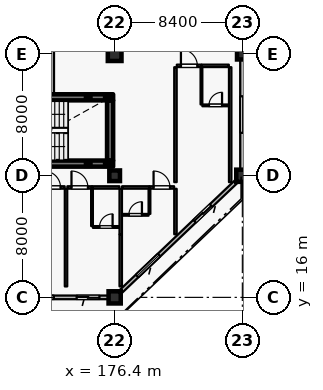
"""IFC4 building model, lengths in metres.
Left out: names, types, materials, properties, quantities, classifications, styles, units other than length and angle.
Written with IfcOpenShell. Run it as: python <this file> out.ifc"""

import sys

from ifc_helpers import new_model, si_unit, direction, frame, frame_2d, origin, origin_2d, place, context, subcontext, project, spatial, rectangle, hollow_rectangle, extrude, element, fill, save


model = new_model("IFC4")
c1 = context("Model", 3, precision=1e-05, world=origin(), true_north=direction((0.0, 1.0)))
c2 = subcontext(c1, "Body", "Model", "MODEL_VIEW")
j1 = project(units=[si_unit("LENGTHUNIT", "METRE"), si_unit("PLANEANGLEUNIT", "RADIAN")], contexts=[c1])
p1 = place(None, origin())
s1 = spatial("IfcSite", under=j1, at=p1, CompositionType="ELEMENT")
p2 = place(p1, origin())
s2 = spatial("IfcBuilding", under=s1, at=p2, CompositionType="ELEMENT")
p3 = place(p2, frame((0.0, 0.0, 21.0)))
s3 = spatial("IfcBuildingStorey", under=s2, at=p3, CompositionType="ELEMENT", Elevation=21.0)
p4 = place(p3, frame((176.4, 16.0, 0.0), z_axis=(0.0, 0.0, 1.0), x_axis=(1.0, 0.0, 0.0)))
e1 = element("IfcColumn", 1, at=p4, inside=s3, PredefinedType="COLUMN", context=c2, shape_type="SweptSolid", body=[
    extrude(rectangle(XDim=0.8, YDim=0.8, at=origin_2d()), origin(), (0.0, 0.0, 1.0), 4.2),
])
p5 = place(p3, frame((176.4, 32.0, 0.0), z_axis=(0.0, 0.0, 1.0), x_axis=(1.0, 0.0, 0.0)))
e2 = element("IfcColumn", 2, at=p5, inside=s3, PredefinedType="COLUMN", context=c2, shape_type="SweptSolid", body=[
    extrude(rectangle(XDim=0.9, YDim=0.9, at=origin_2d()), origin(), (0.0, 0.0, 1.0), 4.2),
])
p6 = place(p3, frame((184.8, 24.0, 0.0), z_axis=(0.0, 0.0, 1.0), x_axis=(1.0, 0.0, 0.0)))
e3 = element("IfcColumn", 3, at=p6, inside=s3, PredefinedType="COLUMN", context=c2, shape_type="SweptSolid", body=[
    extrude(rectangle(XDim=0.8, YDim=0.8, at=origin_2d()), origin(), (0.0, 0.0, 1.0), 4.2),
])
for number, where, z_axis, x_axis in (
    (4, (176.4, 24.0, 0.0), (0.0, 0.0, 1.0), (1.0, 0.0, 0.0)),
    (5, (184.8, 32.0, 0.0), (0.0, 0.0, 1.0), (1.0, 0.0, 0.0)),
):
    element("IfcColumn", number, at=place(p3, frame(where, z_axis=z_axis, x_axis=x_axis)), inside=s3, PredefinedType="COLUMN", context=c2, shape_type="SweptSolid", body=[
        extrude(rectangle(XDim=0.7, YDim=0.7, at=origin_2d()), origin(), (0.0, 0.0, 1.0), 4.2),
    ])
p7 = place(p3, frame((176.0, 16.0, 0.0), z_axis=(0.0, 0.0, 1.0), x_axis=(-1.0, 0.0, 0.0)))
e6 = element("IfcWall", 6, at=p7, inside=s3, PredefinedType="SOLIDWALL", context=c2, shape_type="SweptSolid", body=[
    extrude(rectangle(XDim=7.6, YDim=0.24, at=frame_2d((3.8, 0.0))), origin(), (0.0, 0.0, 1.0), 3.53),
])
p8 = place(p7, frame((0.6, 0.0, 0.0)))
e7 = element("IfcOpeningElement", 7, at=p8, cuts=e6, PredefinedType="OPENING", context=c2, shape_type="SweptSolid", body=[
    extrude(rectangle(XDim=1.5, YDim=2.25, at=frame_2d((0.75, 1.125))), frame((0.0, 0.13, 0.0), z_axis=(0.0, -1.0, 0.0), x_axis=(1.0, 0.0, 0.0)), (0.0, 0.0, 1.0), 0.26),
])
p9 = place(p7, frame((3.6, 0.0, 0.8)))
e8 = element("IfcOpeningElement", 8, at=p9, cuts=e6, PredefinedType="OPENING", context=c2, shape_type="SweptSolid", body=[
    extrude(rectangle(XDim=2.0, YDim=1.75, at=frame_2d((1.0, 0.875))), frame((0.0, 0.13, 0.0), z_axis=(0.0, -1.0, 0.0), x_axis=(1.0, 0.0, 0.0)), (0.0, 0.0, 1.0), 0.26),
])
p10 = place(p3, frame((184.4, 23.619, 0.0), z_axis=(0.0, 0.0, 1.0), x_axis=(-0.724145676014, -0.689647040094, 0.0)))
e9 = element("IfcWall", 9, at=p10, inside=s3, PredefinedType="SOLIDWALL", context=c2, shape_type="SweptSolid", body=[
    extrude(rectangle(XDim=10.495, YDim=0.24, at=frame_2d((5.248, 0.0))), origin(), (0.0, 0.0, 1.0), 3.53),
])
p11 = place(p10, frame((2.288, 0.0, 0.0)))
e10 = element("IfcOpeningElement", 10, at=p11, cuts=e9, PredefinedType="OPENING", context=c2, shape_type="SweptSolid", body=[
    extrude(rectangle(XDim=1.5, YDim=2.25, at=frame_2d((0.75, 1.125))), frame((0.0, 0.13, 0.0), z_axis=(0.0, -1.0, 0.0), x_axis=(1.0, 0.0, 0.0)), (0.0, 0.0, 1.0), 0.26),
])
p12 = place(p10, frame((7.009, 0.0, 0.8)))
e11 = element("IfcOpeningElement", 11, at=p12, cuts=e9, PredefinedType="OPENING", context=c2, shape_type="SweptSolid", body=[
    extrude(rectangle(XDim=2.0, YDim=1.75, at=frame_2d((1.0, 0.875))), frame((0.0, 0.13, 0.0), z_axis=(0.0, -1.0, 0.0), x_axis=(1.0, 0.0, 0.0)), (0.0, 0.0, 1.0), 0.26),
])
p13 = place(p3, frame((184.8, 31.65, 0.0), z_axis=(0.0, 0.0, 1.0), x_axis=(0.0, -1.0, 0.0)))
e12 = element("IfcWall", 12, at=p13, inside=s3, PredefinedType="SOLIDWALL", context=c2, shape_type="SweptSolid", body=[
    extrude(rectangle(XDim=7.25, YDim=0.28, at=frame_2d((3.625, 0.0))), origin(), (0.0, 0.0, 1.0), 3.3),
])
p14 = place(p13, frame((2.425, 0.0, 0.75)))
e13 = element("IfcOpeningElement", 13, at=p14, cuts=e12, PredefinedType="OPENING", context=c2, shape_type="SweptSolid", body=[
    extrude(rectangle(XDim=2.4, YDim=1.65, at=frame_2d((1.2, 0.825))), frame((0.0, 0.15, 0.0), z_axis=(0.0, -1.0, 0.0), x_axis=(1.0, 0.0, 0.0)), (0.0, 0.0, 1.0), 0.3),
])
p15 = place(p3, frame((168.1, 24.8, 0.0), z_axis=(0.0, 0.0, 1.0), x_axis=(1.0, 0.0, 0.0)))
e14 = element("IfcWall", 14, at=p15, inside=s3, PredefinedType="SHEAR", context=c2, shape_type="SweptSolid", body=[
    extrude(rectangle(XDim=8.2, YDim=0.4, at=frame_2d((4.1, 0.0))), origin(), (0.0, 0.0, 1.0), 3.965),
])
p16 = place(p3, frame((176.1, 25.005, 0.0), z_axis=(0.0, 0.0, 1.0), x_axis=(0.0, 1.0, 0.0)))
e15 = element("IfcWall", 15, at=p16, inside=s3, PredefinedType="SHEAR", context=c2, shape_type="SweptSolid", body=[
    extrude(rectangle(XDim=3.95, YDim=0.4, at=frame_2d((1.975, 0.0))), origin(), (0.0, 0.0, 1.0), 3.965),
])
p17 = place(p3, frame((168.1, 29.16, 0.0), z_axis=(0.0, 0.0, 1.0), x_axis=(1.0, 0.0, 0.0)))
e16 = element("IfcWall", 16, at=p17, inside=s3, PredefinedType="SHEAR", context=c2, shape_type="SweptSolid", body=[
    extrude(rectangle(XDim=8.2, YDim=0.4, at=frame_2d((4.1, 0.0))), origin(), (0.0, 0.0, 1.0), 3.965),
])
p18 = place(p17, frame((0.43, 0.0, 0.0)))
e17 = element("IfcOpeningElement", 17, at=p18, cuts=e16, PredefinedType="OPENING", context=c2, shape_type="SweptSolid", body=[
    extrude(rectangle(XDim=1.16, YDim=2.2, at=frame_2d((0.58, 1.1))), frame((0.0, 0.21, 0.0), z_axis=(0.0, -1.0, 0.0), x_axis=(1.0, 0.0, 0.0)), (0.0, 0.0, 1.0), 0.42),
])
p19 = place(p3, frame((172.3, 29.365, 0.0), z_axis=(0.0, 0.0, 1.0), x_axis=(0.0, 1.0, 0.0)))
e18 = element("IfcWall", 18, at=p19, inside=s3, PredefinedType="PARTITIONING", context=c2, shape_type="SweptSolid", body=[
    extrude(rectangle(XDim=2.92, YDim=0.22, at=frame_2d((1.46, 0.0))), origin(), (0.0, 0.0, 1.0), 3.965),
])
for number, where, z_axis, x_axis in (
    (19, (174.66, 24.8, -2.4), (0.0, 0.0, 1.0), (1.0, 0.0, 0.0)),
    (20, (174.66, 29.16, -2.4), (0.0, 0.0, 1.0), (1.0, 0.0, 0.0)),
    (21, (175.92, 24.8, -2.4), (0.0, 0.0, 1.0), (1.0, 0.0, 0.0)),
    (22, (175.92, 29.16, -2.4), (0.0, 0.0, 1.0), (1.0, 0.0, 0.0)),
):
    element("IfcColumn", number, at=place(p3, frame(where, z_axis=z_axis, x_axis=x_axis)), inside=s3, PredefinedType="COLUMN", context=c2, shape_type="SweptSolid", body=[
        extrude(hollow_rectangle(XDim=0.3, YDim=0.3, WallThickness=0.012, at=origin_2d()), origin(), (0.0, 0.0, 1.0), 4.32),
    ])
p20 = place(p3, frame((171.49, 23.23, 0.0), z_axis=(0.0, 0.0, 1.0), x_axis=(1.0, 0.0, 0.0)))
e23 = element("IfcWall", 23, at=p20, inside=s3, PredefinedType="PARTITIONING", context=c2, shape_type="SweptSolid", body=[
    extrude(rectangle(XDim=1.62, YDim=0.16, at=frame_2d((0.81, 0.0))), origin(), (0.0, 0.0, 1.0), 3.965),
])
p21 = place(p20, frame((0.27, 0.0, 0.0)))
e24 = element("IfcOpeningElement", 24, at=p21, cuts=e23, PredefinedType="OPENING", context=c2, shape_type="SweptSolid", body=[
    extrude(rectangle(XDim=1.08, YDim=2.3, at=frame_2d((0.54, 1.15))), frame((0.0, 0.09, 0.0), z_axis=(0.0, -1.0, 0.0), x_axis=(1.0, 0.0, 0.0)), (0.0, 0.0, 1.0), 0.18),
])
p22 = place(p3, frame((173.29, 23.23, 0.0), z_axis=(0.0, 0.0, 1.0), x_axis=(1.0, 0.0, 0.0)))
e25 = element("IfcWall", 25, at=p22, inside=s3, PredefinedType="PARTITIONING", context=c2, shape_type="SweptSolid", body=[
    extrude(rectangle(XDim=1.62, YDim=0.16, at=frame_2d((0.81, 0.0))), origin(), (0.0, 0.0, 1.0), 3.965),
])
p23 = place(p22, frame((0.27, 0.0, 0.0)))
e26 = element("IfcOpeningElement", 26, at=p23, cuts=e25, PredefinedType="OPENING", context=c2, shape_type="SweptSolid", body=[
    extrude(rectangle(XDim=1.08, YDim=2.3, at=frame_2d((0.54, 1.15))), frame((0.0, 0.09, 0.0), z_axis=(0.0, -1.0, 0.0), x_axis=(1.0, 0.0, 0.0)), (0.0, 0.0, 1.0), 0.18),
])
p24 = place(p3, frame((174.92, 23.23, 0.0), z_axis=(0.0, 0.0, 1.0), x_axis=(1.0, 0.0, 0.0)))
e27 = element("IfcWall", 27, at=p24, inside=s3, PredefinedType="PARTITIONING", context=c2, shape_type="SweptSolid", body=[
    extrude(rectangle(XDim=1.79, YDim=0.16, at=frame_2d((0.895, 0.0))), origin(), (0.0, 0.0, 1.0), 3.965),
])
p25 = place(p3, frame((174.91, 20.69, 0.0), z_axis=(0.0, 0.0, 1.0), x_axis=(0.0, 1.0, 0.0)))
e28 = element("IfcWall", 28, at=p25, inside=s3, PredefinedType="PARTITIONING", context=c2, shape_type="SweptSolid", body=[
    extrude(rectangle(XDim=2.45, YDim=0.115, at=frame_2d((1.225, 0.0))), origin(), (0.0, 0.0, 1.0), 3.965),
])
p26 = place(p3, frame((174.97, 20.63, 0.0), z_axis=(0.0, 0.0, 1.0), x_axis=(1.0, 0.0, 0.0)))
e29 = element("IfcWall", 29, at=p26, inside=s3, PredefinedType="PARTITIONING", context=c2, shape_type="SweptSolid", body=[
    extrude(rectangle(XDim=1.73, YDim=0.115, at=frame_2d((0.865, 0.0))), origin(), (0.0, 0.0, 1.0), 3.965),
])
p27 = place(p26, frame((0.435, 0.0, 0.0)))
e30 = element("IfcOpeningElement", 30, at=p27, cuts=e29, PredefinedType="OPENING", context=c2, shape_type="SweptSolid", body=[
    extrude(rectangle(XDim=0.86, YDim=2.12, at=frame_2d((0.43, 1.06))), frame((0.0, 0.067, 0.0), z_axis=(0.0, -1.0, 0.0), x_axis=(1.0, 0.0, 0.0)), (0.0, 0.0, 1.0), 0.135),
])
p28 = place(p3, frame((173.2, 16.72, 0.0), z_axis=(0.0, 0.0, 1.0), x_axis=(0.0, 1.0, 0.0)))
e31 = element("IfcWall", 31, at=p28, inside=s3, PredefinedType="PARTITIONING", context=c2, shape_type="SweptSolid", body=[
    extrude(rectangle(XDim=6.42, YDim=0.16, at=frame_2d((3.21, 0.0))), origin(), (0.0, 0.0, 1.0), 3.965),
])
p29 = place(p3, frame((176.8, 16.72, 0.0), z_axis=(0.0, 0.0, 1.0), x_axis=(0.0, 1.0, 0.0)))
e32 = element("IfcWall", 32, at=p29, inside=s3, PredefinedType="PARTITIONING", context=c2, shape_type="SweptSolid", body=[
    extrude(rectangle(XDim=3.42, YDim=0.16, at=frame_2d((1.71, 0.0))), origin(), (0.0, 0.0, 1.0), 3.965),
])
p30 = place(p3, frame((176.89, 23.23, 0.0), z_axis=(0.0, 0.0, 1.0), x_axis=(1.0, 0.0, 0.0)))
e33 = element("IfcWall", 33, at=p30, inside=s3, PredefinedType="PARTITIONING", context=c2, shape_type="SweptSolid", body=[
    extrude(rectangle(XDim=1.79, YDim=0.16, at=frame_2d((0.895, 0.0))), origin(), (0.0, 0.0, 1.0), 3.965),
])
p31 = place(p3, frame((178.69, 23.23, 0.0), z_axis=(0.0, 0.0, 1.0), x_axis=(1.0, 0.0, 0.0)))
e34 = element("IfcWall", 34, at=p31, inside=s3, PredefinedType="PARTITIONING", context=c2, shape_type="SweptSolid", body=[
    extrude(rectangle(XDim=1.62, YDim=0.16, at=frame_2d((0.81, 0.0))), origin(), (0.0, 0.0, 1.0), 3.965),
])
p32 = place(p31, frame((0.27, 0.0, 0.0)))
e35 = element("IfcOpeningElement", 35, at=p32, cuts=e34, PredefinedType="OPENING", context=c2, shape_type="SweptSolid", body=[
    extrude(rectangle(XDim=1.08, YDim=2.3, at=frame_2d((0.54, 1.15))), frame((0.0, 0.09, 0.0), z_axis=(0.0, -1.0, 0.0), x_axis=(1.0, 0.0, 0.0)), (0.0, 0.0, 1.0), 0.18),
])
p33 = place(p3, frame((178.69, 21.49, 0.0), z_axis=(0.0, 0.0, 1.0), x_axis=(0.0, 1.0, 0.0)))
e36 = element("IfcWall", 36, at=p33, inside=s3, PredefinedType="PARTITIONING", context=c2, shape_type="SweptSolid", body=[
    extrude(rectangle(XDim=1.65, YDim=0.115, at=frame_2d((0.825, 0.0))), origin(), (0.0, 0.0, 1.0), 3.965),
])
p34 = place(p3, frame((176.9, 21.43, 0.0), z_axis=(0.0, 0.0, 1.0), x_axis=(1.0, 0.0, 0.0)))
e37 = element("IfcWall", 37, at=p34, inside=s3, PredefinedType="PARTITIONING", context=c2, shape_type="SweptSolid", body=[
    extrude(rectangle(XDim=1.73, YDim=0.115, at=frame_2d((0.865, 0.0))), origin(), (0.0, 0.0, 1.0), 3.965),
])
p35 = place(p34, frame((0.435, 0.0, 0.0)))
e38 = element("IfcOpeningElement", 38, at=p35, cuts=e37, PredefinedType="OPENING", context=c2, shape_type="SweptSolid", body=[
    extrude(rectangle(XDim=0.86, YDim=2.12, at=frame_2d((0.43, 1.06))), frame((0.0, 0.067, 0.0), z_axis=(0.0, -1.0, 0.0), x_axis=(1.0, 0.0, 0.0)), (0.0, 0.0, 1.0), 0.135),
])
for number, where, z_axis, x_axis in (
    (39, (176.8, 20.15, 0.0), (0.0, 0.0, 1.0), (0.0, 1.0, 0.0)),
    (40, (180.4, 20.15, 0.0), (0.0, 0.0, 1.0), (0.0, 1.0, 0.0)),
):
    element("IfcWall", number, at=place(p3, frame(where, z_axis=z_axis, x_axis=x_axis)), inside=s3, PredefinedType="PARTITIONING", context=c2, shape_type="SweptSolid", body=[
        extrude(rectangle(XDim=2.99, YDim=0.16, at=frame_2d((1.495, 0.0))), origin(), (0.0, 0.0, 1.0), 3.965),
    ])
p36 = place(p3, frame((180.49, 31.23, 0.0), z_axis=(0.0, 0.0, 1.0), x_axis=(1.0, 0.0, 0.0)))
e41 = element("IfcWall", 41, at=p36, inside=s3, PredefinedType="PARTITIONING", context=c2, shape_type="SweptSolid", body=[
    extrude(rectangle(XDim=1.62, YDim=0.16, at=frame_2d((0.81, 0.0))), origin(), (0.0, 0.0, 1.0), 3.965),
])
p37 = place(p36, frame((0.27, 0.0, 0.0)))
e42 = element("IfcOpeningElement", 42, at=p37, cuts=e41, PredefinedType="OPENING", context=c2, shape_type="SweptSolid", body=[
    extrude(rectangle(XDim=1.08, YDim=2.3, at=frame_2d((0.54, 1.15))), frame((0.0, 0.09, 0.0), z_axis=(0.0, -1.0, 0.0), x_axis=(1.0, 0.0, 0.0)), (0.0, 0.0, 1.0), 0.18),
])
p38 = place(p3, frame((182.12, 31.23, 0.0), z_axis=(0.0, 0.0, 1.0), x_axis=(1.0, 0.0, 0.0)))
e43 = element("IfcWall", 43, at=p38, inside=s3, PredefinedType="PARTITIONING", context=c2, shape_type="SweptSolid", body=[
    extrude(rectangle(XDim=1.79, YDim=0.16, at=frame_2d((0.895, 0.0))), origin(), (0.0, 0.0, 1.0), 3.965),
])
p39 = place(p3, frame((182.11, 28.69, 0.0), z_axis=(0.0, 0.0, 1.0), x_axis=(0.0, 1.0, 0.0)))
e44 = element("IfcWall", 44, at=p39, inside=s3, PredefinedType="PARTITIONING", context=c2, shape_type="SweptSolid", body=[
    extrude(rectangle(XDim=2.45, YDim=0.115, at=frame_2d((1.225, 0.0))), origin(), (0.0, 0.0, 1.0), 3.965),
])
p40 = place(p3, frame((182.17, 28.63, 0.0), z_axis=(0.0, 0.0, 1.0), x_axis=(1.0, 0.0, 0.0)))
e45 = element("IfcWall", 45, at=p40, inside=s3, PredefinedType="PARTITIONING", context=c2, shape_type="SweptSolid", body=[
    extrude(rectangle(XDim=1.73, YDim=0.115, at=frame_2d((0.865, 0.0))), origin(), (0.0, 0.0, 1.0), 3.965),
])
p41 = place(p40, frame((0.435, 0.0, 0.0)))
e46 = element("IfcOpeningElement", 46, at=p41, cuts=e45, PredefinedType="OPENING", context=c2, shape_type="SweptSolid", body=[
    extrude(rectangle(XDim=0.86, YDim=2.12, at=frame_2d((0.43, 1.06))), frame((0.0, 0.067, 0.0), z_axis=(0.0, -1.0, 0.0), x_axis=(1.0, 0.0, 0.0)), (0.0, 0.0, 1.0), 0.135),
])
for number, where, z_axis, x_axis in (
    (47, (180.4, 23.58, 0.0), (0.0, 0.0, 1.0), (0.0, 1.0, 0.0)),
    (48, (184.0, 23.58, 0.0), (0.0, 0.0, 1.0), (0.0, 1.0, 0.0)),
):
    element("IfcWall", number, at=place(p3, frame(where, z_axis=z_axis, x_axis=x_axis)), inside=s3, PredefinedType="PARTITIONING", context=c2, shape_type="SweptSolid", body=[
        extrude(rectangle(XDim=7.56, YDim=0.16, at=frame_2d((3.78, 0.0))), origin(), (0.0, 0.0, 1.0), 3.965),
    ])
p42 = place(p8, origin())
e49 = element("IfcDoor", 49, at=p42, inside=s3, OperationType="SLIDING_TO_LEFT", PredefinedType="DOOR", context=c2, shape_type="SweptSolid", body=[
    extrude(rectangle(XDim=1.5, YDim=2.25, at=frame_2d((0.75, 1.125))), frame((0.0, 0.025, 0.0), z_axis=(0.0, -1.0, 0.0), x_axis=(1.0, 0.0, 0.0)), (0.0, 0.0, 1.0), 0.05),
])
fill(e7, e49)
p43 = place(p9, origin())
e50 = element("IfcWindow", 50, at=p43, inside=s3, PartitioningType="DOUBLE_PANEL_VERTICAL", PredefinedType="WINDOW", context=c2, shape_type="SweptSolid", body=[
    extrude(rectangle(XDim=2.0, YDim=1.75, at=frame_2d((1.0, 0.875))), frame((0.0, 0.03, 0.0), z_axis=(0.0, -1.0, 0.0), x_axis=(1.0, 0.0, 0.0)), (0.0, 0.0, 1.0), 0.06),
])
fill(e8, e50)
p44 = place(p11, origin())
e51 = element("IfcDoor", 51, at=p44, inside=s3, OperationType="SLIDING_TO_LEFT", PredefinedType="DOOR", context=c2, shape_type="SweptSolid", body=[
    extrude(rectangle(XDim=1.5, YDim=2.25, at=frame_2d((0.75, 1.125))), frame((0.0, 0.025, 0.0), z_axis=(0.0, -1.0, 0.0), x_axis=(1.0, 0.0, 0.0)), (0.0, 0.0, 1.0), 0.05),
])
fill(e10, e51)
p45 = place(p12, origin())
e52 = element("IfcWindow", 52, at=p45, inside=s3, PartitioningType="DOUBLE_PANEL_VERTICAL", PredefinedType="WINDOW", context=c2, shape_type="SweptSolid", body=[
    extrude(rectangle(XDim=2.0, YDim=1.75, at=frame_2d((1.0, 0.875))), frame((0.0, 0.03, 0.0), z_axis=(0.0, -1.0, 0.0), x_axis=(1.0, 0.0, 0.0)), (0.0, 0.0, 1.0), 0.06),
])
fill(e11, e52)
p46 = place(p14, origin())
e53 = element("IfcWindow", 53, at=p46, inside=s3, PartitioningType="DOUBLE_PANEL_VERTICAL", PredefinedType="WINDOW", context=c2, shape_type="SweptSolid", body=[
    extrude(rectangle(XDim=2.4, YDim=1.65, at=frame_2d((1.2, 0.825))), frame((0.0, 0.03, 0.0), z_axis=(0.0, -1.0, 0.0), x_axis=(1.0, 0.0, 0.0)), (0.0, 0.0, 1.0), 0.06),
])
fill(e13, e53)
p47 = place(p21, origin())
e54 = element("IfcDoor", 54, at=p47, inside=s3, OperationType="SINGLE_SWING_LEFT", PredefinedType="DOOR", context=c2, shape_type="SweptSolid", body=[
    extrude(rectangle(XDim=1.08, YDim=2.3, at=frame_2d((0.54, 1.15))), frame((0.0, 0.025, 0.0), z_axis=(0.0, -1.0, 0.0), x_axis=(1.0, 0.0, 0.0)), (0.0, 0.0, 1.0), 0.05),
])
fill(e24, e54)
p48 = place(p23, origin())
e55 = element("IfcDoor", 55, at=p48, inside=s3, OperationType="SINGLE_SWING_LEFT", PredefinedType="DOOR", context=c2, shape_type="SweptSolid", body=[
    extrude(rectangle(XDim=1.08, YDim=2.3, at=frame_2d((0.54, 1.15))), frame((0.0, 0.025, 0.0), z_axis=(0.0, -1.0, 0.0), x_axis=(1.0, 0.0, 0.0)), (0.0, 0.0, 1.0), 0.05),
])
fill(e26, e55)
p49 = place(p27, origin())
e56 = element("IfcDoor", 56, at=p49, inside=s3, OperationType="SINGLE_SWING_RIGHT", PredefinedType="DOOR", context=c2, shape_type="SweptSolid", body=[
    extrude(rectangle(XDim=0.86, YDim=2.12, at=frame_2d((0.43, 1.06))), frame((0.0, 0.025, 0.0), z_axis=(0.0, -1.0, 0.0), x_axis=(1.0, 0.0, 0.0)), (0.0, 0.0, 1.0), 0.05),
])
fill(e30, e56)
p50 = place(p32, origin())
e57 = element("IfcDoor", 57, at=p50, inside=s3, OperationType="SINGLE_SWING_LEFT", PredefinedType="DOOR", context=c2, shape_type="SweptSolid", body=[
    extrude(rectangle(XDim=1.08, YDim=2.3, at=frame_2d((0.54, 1.15))), frame((0.0, 0.025, 0.0), z_axis=(0.0, -1.0, 0.0), x_axis=(1.0, 0.0, 0.0)), (0.0, 0.0, 1.0), 0.05),
])
fill(e35, e57)
p51 = place(p35, origin())
e58 = element("IfcDoor", 58, at=p51, inside=s3, OperationType="SINGLE_SWING_RIGHT", PredefinedType="DOOR", context=c2, shape_type="SweptSolid", body=[
    extrude(rectangle(XDim=0.86, YDim=2.12, at=frame_2d((0.43, 1.06))), frame((0.0, 0.025, 0.0), z_axis=(0.0, -1.0, 0.0), x_axis=(1.0, 0.0, 0.0)), (0.0, 0.0, 1.0), 0.05),
])
fill(e38, e58)
p52 = place(p37, origin())
e59 = element("IfcDoor", 59, at=p52, inside=s3, OperationType="SINGLE_SWING_LEFT", PredefinedType="DOOR", context=c2, shape_type="SweptSolid", body=[
    extrude(rectangle(XDim=1.08, YDim=2.3, at=frame_2d((0.54, 1.15))), frame((0.0, 0.025, 0.0), z_axis=(0.0, -1.0, 0.0), x_axis=(1.0, 0.0, 0.0)), (0.0, 0.0, 1.0), 0.05),
])
fill(e42, e59)
p53 = place(p41, origin())
e60 = element("IfcDoor", 60, at=p53, inside=s3, OperationType="SINGLE_SWING_RIGHT", PredefinedType="DOOR", context=c2, shape_type="SweptSolid", body=[
    extrude(rectangle(XDim=0.86, YDim=2.12, at=frame_2d((0.43, 1.06))), frame((0.0, 0.025, 0.0), z_axis=(0.0, -1.0, 0.0), x_axis=(1.0, 0.0, 0.0)), (0.0, 0.0, 1.0), 0.05),
])
fill(e46, e60)
save(model, sys.argv[1])
